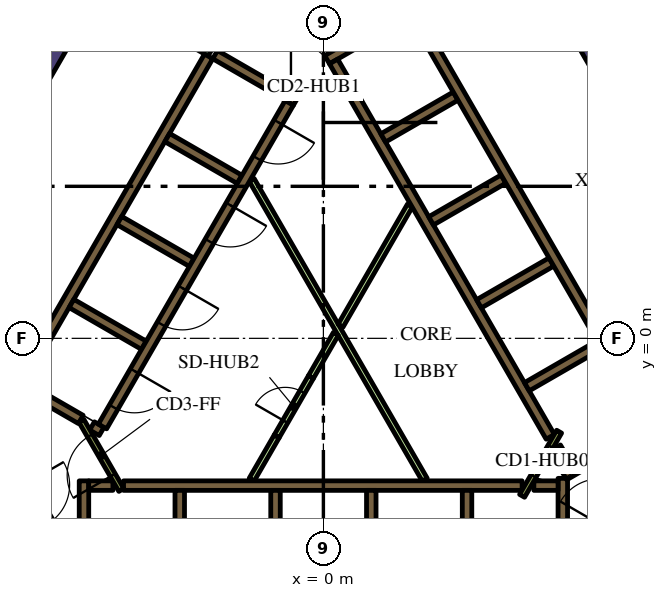
"""IFC4 building model, lengths in metres.
Left out: names, types, materials, properties, quantities, classifications, styles, units other than length and angle.
Written with IfcOpenShell. Run it as: python <this file> out.ifc"""

import sys

from ifc_helpers import new_model, si_unit, direction, frame, frame_2d, origin, place, context, subcontext, project, spatial, polyline, rectangle, outline, extrude, element, fill, save


model = new_model("IFC4")
c1 = context("Model", 3, precision=1e-05, world=origin(), true_north=direction((0.0, 1.0)))
c2 = subcontext(c1, "Body", "Model", "MODEL_VIEW")
j1 = project(units=[si_unit("LENGTHUNIT", "METRE"), si_unit("PLANEANGLEUNIT", "RADIAN")], contexts=[c1])
p1 = place(None, origin())
s1 = spatial("IfcSite", under=j1, at=p1, CompositionType="ELEMENT")
p2 = place(p1, origin())
s2 = spatial("IfcBuilding", under=s1, at=p2, CompositionType="ELEMENT")
p3 = place(p2, frame((0.0, 0.0, 196.2)))
s3 = spatial("IfcBuildingStorey", under=s2, at=p3, CompositionType="ELEMENT", Elevation=196.2)
p4 = place(p3, frame((8.279, 5.761, 0.0), z_axis=(0.0, 0.0, 1.0), x_axis=(-0.500010359015, 0.866019422922, 0.0)))
e1 = element("IfcWall", 1, at=p4, inside=s3, PredefinedType="SOLIDWALL", context=c2, shape_type="SweptSolid", body=[
    extrude(rectangle(XDim=12.528, YDim=0.8, at=frame_2d((6.264, 0.0))), origin(), (0.0, 0.0, 1.0), 5.4),
])
p5 = place(p3, frame((-4.321, 12.616, 0.0), z_axis=(0.0, 0.0, 1.0), x_axis=(-0.500009809857, -0.866019739987, 0.0)))
e2 = element("IfcWall", 2, at=p5, inside=s3, PredefinedType="SOLIDWALL", context=c2, shape_type="SweptSolid", body=[
    extrude(rectangle(XDim=16.695, YDim=0.8, at=frame_2d((8.347, 0.0))), origin(), (0.0, 0.0, 1.0), 5.4),
])
p6 = place(p3, frame((-5.259, -3.875, 0.0), z_axis=(0.0, 0.0, 1.0), x_axis=(1.0, 0.0, 0.0)))
e3 = element("IfcWall", 3, at=p6, inside=s3, PredefinedType="SOLIDWALL", context=c2, shape_type="SweptSolid", body=[
    extrude(rectangle(XDim=10.489, YDim=0.25, at=frame_2d((5.244, 0.0))), origin(), (0.0, 0.0, 1.0), 5.4),
])
for number, where, z_axis, x_axis in (
    (4, (3.78, -4.0, 0.0), (0.0, 0.0, 1.0), (0.0, -1.0, 0.0)),
    (5, (1.26, -4.0, 0.0), (0.0, 0.0, 1.0), (0.0, -1.0, 0.0)),
    (6, (-1.26, -4.0, 0.0), (0.0, 0.0, 1.0), (0.0, -1.0, 0.0)),
    (7, (-3.78, -4.0, 0.0), (0.0, 0.0, 1.0), (0.0, -1.0, 0.0)),
):
    element("IfcWall", number, at=place(p3, frame(where, z_axis=z_axis, x_axis=x_axis)), inside=s3, PredefinedType="SOLIDWALL", context=c2, shape_type="SweptSolid", body=[
        extrude(rectangle(XDim=2.2, YDim=0.25, at=frame_2d((1.1, 0.0))), origin(), (0.0, 0.0, 1.0), 5.4),
    ])
p7 = place(p3, frame((-6.3, -7.125, 0.0), z_axis=(0.0, 0.0, 1.0), x_axis=(0.0, 1.0, 0.0)))
e8 = element("IfcWall", 8, at=p7, inside=s3, PredefinedType="SOLIDWALL", context=c2, shape_type="SweptSolid", body=[
    extrude(rectangle(XDim=3.375, YDim=0.25, at=frame_2d((1.687, 0.0))), origin(), (0.0, 0.0, 1.0), 5.4),
])
p8 = place(p3, frame((-6.175, -3.875, 0.0), z_axis=(0.0, 0.0, 1.0), x_axis=(1.0, 0.0, 0.0)))
e9 = element("IfcWall", 9, at=p8, inside=s3, PredefinedType="SOLIDWALL", context=c2, shape_type="SweptSolid", body=[
    extrude(rectangle(XDim=0.637, YDim=0.25, at=frame_2d((0.318, 0.0))), origin(), (0.0, 0.0, 1.0), 5.4),
])
p9 = place(p3, frame((6.3, -7.24, 0.0), z_axis=(0.0, 0.0, 1.0), x_axis=(0.0, 1.0, 0.0)))
e10 = element("IfcWall", 10, at=p9, inside=s3, PredefinedType="SOLIDWALL", context=c2, shape_type="SweptSolid", body=[
    extrude(rectangle(XDim=3.556, YDim=0.25, at=frame_2d((1.778, 0.0))), origin(), (0.0, 0.0, 1.0), 5.4),
])
p10 = place(p3, frame((5.538, -3.875, 0.0), z_axis=(0.0, 0.0, 1.0), x_axis=(1.0, 0.0, 0.0)))
e11 = element("IfcWall", 11, at=p10, inside=s3, PredefinedType="SOLIDWALL", context=c2, shape_type="SweptSolid", body=[
    extrude(rectangle(XDim=0.637, YDim=0.25, at=frame_2d((0.318, 0.0))), origin(), (0.0, 0.0, 1.0), 5.4),
])
p11 = place(p3, frame((9.19, -1.969, 0.0), z_axis=(0.0, 0.0, 1.0), x_axis=(-0.866057109641, -0.499945079824, 0.0)))
e12 = element("IfcWall", 12, at=p11, inside=s3, PredefinedType="SOLIDWALL", context=c2, shape_type="SweptSolid", body=[
    extrude(rectangle(XDim=3.291, YDim=0.25, at=frame_2d((1.646, 0.0))), origin(), (0.0, 0.0, 1.0), 5.4),
])
p12 = place(p3, frame((6.13, -2.867, 0.0), z_axis=(0.0, 0.0, 1.0), x_axis=(0.500160776593, -0.865932559475, 0.0)))
e13 = element("IfcWall", 13, at=p12, inside=s3, PredefinedType="SOLIDWALL", context=c2, shape_type="SweptSolid", body=[
    extrude(rectangle(XDim=0.627, YDim=0.25, at=frame_2d((0.313, 0.0))), origin(), (0.0, 0.0, 1.0), 5.4),
])
p13 = place(p3, frame((3.1, 9.064, 0.0), z_axis=(0.0, 0.0, 1.0), x_axis=(-0.866033137035, -0.499986605379, 0.0)))
e14 = element("IfcWall", 14, at=p13, inside=s3, PredefinedType="SOLIDWALL", context=c2, shape_type="SweptSolid", body=[
    extrude(rectangle(XDim=3.467, YDim=0.25, at=frame_2d((1.733, 0.0))), origin(), (0.0, 0.0, 1.0), 5.4),
])
p14 = place(p3, frame((0.268, 7.285, 0.0), z_axis=(0.0, 0.0, 1.0), x_axis=(0.500098681536, -0.865968422476, 0.0)))
e15 = element("IfcWall", 15, at=p14, inside=s3, PredefinedType="SOLIDWALL", context=c2, shape_type="SweptSolid", body=[
    extrude(rectangle(XDim=0.636, YDim=0.25, at=frame_2d((0.318, 0.0))), origin(), (0.0, 0.0, 1.0), 5.4),
])
p15 = place(p3, frame((5.97, -2.591, 0.0), z_axis=(0.0, 0.0, 1.0), x_axis=(-0.499994469932, 0.866028596547, 0.0)))
e16 = element("IfcWall", 16, at=p15, inside=s3, PredefinedType="SOLIDWALL", context=c2, shape_type="SweptSolid", body=[
    extrude(rectangle(XDim=10.488, YDim=0.25, at=frame_2d((5.244, 0.0))), origin(), (0.0, 0.0, 1.0), 5.4),
])
p16 = place(p3, frame((1.574, 5.274, 0.0), z_axis=(0.0, 0.0, 1.0), x_axis=(0.866028486751, 0.499994660107, 0.0)))
e17 = element("IfcWall", 17, at=p16, inside=s3, PredefinedType="SOLIDWALL", context=c2, shape_type="SweptSolid", body=[
    extrude(rectangle(XDim=2.2, YDim=0.25, at=frame_2d((1.1, 0.0))), origin(), (0.0, 0.0, 1.0), 5.4),
])
for number, where, z_axis, x_axis in (
    (18, (2.834, 3.091, 0.0), (0.0, 0.0, 1.0), (0.866, 0.5, 0.0)),
    (19, (4.094, 0.909, 0.0), (0.0, 0.0, 1.0), (0.866, 0.5, 0.0)),
    (20, (5.354, -1.274, 0.0), (0.0, 0.0, 1.0), (0.866, 0.5, 0.0)),
):
    element("IfcWall", number, at=place(p3, frame(where, z_axis=z_axis, x_axis=x_axis)), inside=s3, PredefinedType="SOLIDWALL", context=c2, shape_type="SweptSolid", body=[
        extrude(rectangle(XDim=2.2, YDim=0.25, at=frame_2d((1.1, 0.0))), origin(), (0.0, 0.0, 1.0), 5.4),
    ])
p17 = place(p3, frame((-3.02, 7.419, 0.0), z_axis=(0.0, 0.0, 1.0), x_axis=(-0.500022956343, -0.866012149528, 0.0)))
e21 = element("IfcWall", 21, at=p17, inside=s3, PredefinedType="SOLIDWALL", context=c2, shape_type="SweptSolid", body=[
    extrude(rectangle(XDim=10.08, YDim=0.25, at=frame_2d((5.04, 0.0))), origin(), (0.0, 0.0, 1.0), 5.4),
])
p18 = place(p3, origin())
e22 = element("IfcWall", 22, at=p18, inside=s3, PredefinedType="SOLIDWALL", context=c2, shape_type="SweptSolid", body=[
    extrude(outline(polyline([(-2.912, 7.356), (-2.787, 7.573), (-1.232, 6.675), (-1.303, 6.675), (-1.304, 6.675), (-1.304, 6.675), (-1.304, 6.525), (-1.304, 6.525), (-1.303, 6.525), (-0.971, 6.525), (-0.665, 6.348), (-0.79, 6.132), (-1.007, 6.257), (-1.007, 6.257), (-2.912, 7.356)])), origin(), (0.0, 0.0, 1.0), 5.4),
])
for number, where, z_axis, x_axis in (
    (23, (-2.204, 4.182, 0.0), (0.0, 0.0, 1.0), (-0.866, 0.5, 0.0)),
    (24, (-5.369, 3.1, 0.0), (0.0, 0.0, 1.0), (0.866, -0.5, 0.0)),
    (25, (-4.724, -0.182, 0.0), (0.0, 0.0, 1.0), (-0.866, 0.5, 0.0)),
):
    element("IfcWall", number, at=place(p3, frame(where, z_axis=z_axis, x_axis=x_axis)), inside=s3, PredefinedType="SOLIDWALL", context=c2, shape_type="SweptSolid", body=[
        extrude(rectangle(XDim=2.2, YDim=0.25, at=frame_2d((1.1, 0.0))), origin(), (0.0, 0.0, 1.0), 5.4),
    ])
p19 = place(p3, frame((-6.088, -2.305, 0.0), z_axis=(0.0, 0.0, 1.0), x_axis=(0.866059450854, -0.499941024108, 0.0)))
e26 = element("IfcWall", 26, at=p19, inside=s3, PredefinedType="SOLIDWALL", context=c2, shape_type="SweptSolid", body=[
    extrude(rectangle(XDim=0.29, YDim=0.25, at=frame_2d((0.145, 0.0))), origin(), (0.0, 0.0, 1.0), 5.4),
])
p20 = place(p3, frame((-7.889, -1.265, 0.0), z_axis=(0.0, 0.0, 1.0), x_axis=(0.865986741702, -0.500066958712, 0.0)))
e27 = element("IfcWall", 27, at=p20, inside=s3, PredefinedType="SOLIDWALL", context=c2, shape_type="SweptSolid", body=[
    extrude(rectangle(XDim=1.738, YDim=0.25, at=frame_2d((0.869, 0.0))), origin(), (0.0, 0.0, 1.0), 5.4),
])
p21 = place(p3, frame((-1.887, 4.168, 0.0), z_axis=(0.0, 0.0, 1.0), x_axis=(0.499997069472, -0.866027095719, 0.0)))
e28 = element("IfcWall", 28, at=p21, inside=s3, PredefinedType="PARTITIONING", context=c2, shape_type="SweptSolid", body=[
    extrude(rectangle(XDim=9.106, YDim=0.15, at=frame_2d((4.553, 0.0))), origin(), (0.0, 0.0, 1.0), 4.65),
])
p22 = place(p3, frame((-0.329, -1.021, 0.0), z_axis=(0.0, 0.0, 1.0), x_axis=(0.500033191285, 0.866006239939, 0.0)))
e29 = element("IfcWall", 29, at=p22, inside=s3, PredefinedType="PARTITIONING", context=c2, shape_type="SweptSolid", body=[
    extrude(rectangle(XDim=1.315, YDim=0.15, at=frame_2d((0.657, 0.0))), origin(), (0.0, 0.0, 1.0), 4.65),
])
p23 = place(p3, frame((2.277, 3.493, 0.0), z_axis=(0.0, 0.0, 1.0), x_axis=(-0.499994550825, -0.866028549844, 0.0)))
e30 = element("IfcWall", 30, at=p23, inside=s3, PredefinedType="PARTITIONING", context=c2, shape_type="SweptSolid", body=[
    extrude(rectangle(XDim=3.65, YDim=0.15, at=frame_2d((1.825, 0.0))), origin(), (0.0, 0.0, 1.0), 4.65),
])
p24 = place(p3, frame((-1.887, -3.718, 0.0), z_axis=(0.0, 0.0, 1.0), x_axis=(0.500033191285, 0.866006239939, 0.0)))
e31 = element("IfcWall", 31, at=p24, inside=s3, PredefinedType="PARTITIONING", context=c2, shape_type="SweptSolid", body=[
    extrude(rectangle(XDim=1.315, YDim=0.15, at=frame_2d((0.657, 0.0))), origin(), (0.0, 0.0, 1.0), 4.65),
])
p25 = place(p3, frame((8.565, -2.185, 0.0), z_axis=(0.0, 0.0, 1.0), x_axis=(-0.499997954832, 0.866026584559, 0.0)))
e32 = element("IfcWall", 32, at=p25, inside=s3, PredefinedType="SOLIDWALL", context=c2, shape_type="SweptSolid", body=[
    extrude(rectangle(XDim=12.35, YDim=0.25, at=frame_2d((6.175, 0.0))), origin(), (0.0, 0.0, 1.0), 5.4),
])
p26 = place(p25, frame((0.585, 0.0, 0.0)))
e33 = element("IfcOpeningElement", 33, at=p26, cuts=e32, PredefinedType="OPENING", context=c2, shape_type="SweptSolid", body=[
    extrude(rectangle(XDim=1.1, YDim=2.1, at=frame_2d((0.55, 1.05))), frame((0.0, 0.135, 0.0), z_axis=(0.0, -1.0, 0.0), x_axis=(1.0, 0.0, 0.0)), (0.0, 0.0, 1.0), 0.27),
])
p27 = place(p3, frame((-0.898, 6.194, 0.0), z_axis=(0.0, 0.0, 1.0), x_axis=(-0.499996202215, -0.866027596426, 0.0)))
e34 = element("IfcWall", 34, at=p27, inside=s3, PredefinedType="SOLIDWALL", context=c2, shape_type="SweptSolid", body=[
    extrude(rectangle(XDim=9.83, YDim=0.25, at=frame_2d((4.915, 0.0))), origin(), (0.0, 0.0, 1.0), 5.4),
])
p28 = place(p27, frame((0.585, 0.0, 0.0)))
e35 = element("IfcOpeningElement", 35, at=p28, cuts=e34, PredefinedType="OPENING", context=c2, shape_type="SweptSolid", body=[
    extrude(rectangle(XDim=1.1, YDim=2.1, at=frame_2d((0.55, 1.05))), frame((0.0, 0.135, 0.0), z_axis=(0.0, -1.0, 0.0), x_axis=(1.0, 0.0, 0.0)), (0.0, 0.0, 1.0), 0.27),
])
p29 = place(p27, frame((3.105, 0.0, 0.0)))
e36 = element("IfcOpeningElement", 36, at=p29, cuts=e34, PredefinedType="OPENING", context=c2, shape_type="SweptSolid", body=[
    extrude(rectangle(XDim=1.1, YDim=2.1, at=frame_2d((0.55, 1.05))), frame((0.0, 0.135, 0.0), z_axis=(0.0, -1.0, 0.0), x_axis=(1.0, 0.0, 0.0)), (0.0, 0.0, 1.0), 0.27),
])
p30 = place(p27, frame((5.625, 0.0, 0.0)))
e37 = element("IfcOpeningElement", 37, at=p30, cuts=e34, PredefinedType="OPENING", context=c2, shape_type="SweptSolid", body=[
    extrude(rectangle(XDim=1.1, YDim=2.1, at=frame_2d((0.55, 1.05))), frame((0.0, 0.135, 0.0), z_axis=(0.0, -1.0, 0.0), x_axis=(1.0, 0.0, 0.0)), (0.0, 0.0, 1.0), 0.27),
])
p31 = place(p27, frame((8.145, 0.0, 0.0)))
e38 = element("IfcOpeningElement", 38, at=p31, cuts=e34, PredefinedType="OPENING", context=c2, shape_type="SweptSolid", body=[
    extrude(rectangle(XDim=1.1, YDim=2.1, at=frame_2d((0.55, 1.05))), frame((0.0, 0.135, 0.0), z_axis=(0.0, -1.0, 0.0), x_axis=(1.0, 0.0, 0.0)), (0.0, 0.0, 1.0), 0.27),
])
p32 = place(p3, frame((7.053, -5.284, 0.0), z_axis=(0.0, 0.0, 1.0), x_axis=(0.500078061341, 0.865980330357, 0.0)))
e39 = element("IfcWall", 39, at=p32, inside=s3, PredefinedType="SOLIDWALL", context=c2, shape_type="SweptSolid", body=[
    extrude(rectangle(XDim=2.1, YDim=0.4, at=frame_2d((1.05, 0.0))), origin(), (0.0, 0.0, 1.0), 5.4),
])
p33 = place(p32, frame((0.45, 0.0, 0.0)))
e40 = element("IfcOpeningElement", 40, at=p33, cuts=e39, PredefinedType="OPENING", context=c2, shape_type="SweptSolid", body=[
    extrude(rectangle(XDim=1.2, YDim=2.1, at=frame_2d((0.6, 1.05))), frame((0.0, 0.21, 0.0), z_axis=(0.0, -1.0, 0.0), x_axis=(1.0, 0.0, 0.0)), (0.0, 0.0, 1.0), 0.42),
])
p34 = place(p3, frame((-8.103, -3.466, 0.0), z_axis=(0.0, 0.0, 1.0), x_axis=(0.500078061341, -0.865980330357, 0.0)))
e41 = element("IfcWall", 41, at=p34, inside=s3, PredefinedType="SOLIDWALL", context=c2, shape_type="SweptSolid", body=[
    extrude(rectangle(XDim=2.1, YDim=0.4, at=frame_2d((1.05, 0.0))), origin(), (0.0, 0.0, 1.0), 5.4),
])
p35 = place(p34, frame((0.45, 0.0, 0.0)))
e42 = element("IfcOpeningElement", 42, at=p35, cuts=e41, PredefinedType="OPENING", context=c2, shape_type="SweptSolid", body=[
    extrude(rectangle(XDim=1.2, YDim=2.1, at=frame_2d((0.6, 1.05))), frame((0.0, 0.21, 0.0), z_axis=(0.0, -1.0, 0.0), x_axis=(1.0, 0.0, 0.0)), (0.0, 0.0, 1.0), 0.42),
])
p36 = place(p3, frame((6.203, -2.456, 0.0), z_axis=(0.0, 0.0, 1.0), x_axis=(-0.500043961785, -0.866000020948, 0.0)))
e43 = element("IfcWall", 43, at=p36, inside=s3, PredefinedType="PARTITIONING", context=c2, shape_type="SweptSolid", body=[
    extrude(rectangle(XDim=1.95, YDim=0.15, at=frame_2d((0.975, 0.0))), origin(), (0.0, 0.0, 1.0), 5.4),
])
p37 = place(p36, frame((0.45, 0.0, 0.0)))
e44 = element("IfcOpeningElement", 44, at=p37, cuts=e43, PredefinedType="OPENING", context=c2, shape_type="SweptSolid", body=[
    extrude(rectangle(XDim=0.9, YDim=2.1, at=frame_2d((0.45, 1.05))), frame((0.0, 0.085, 0.0), z_axis=(0.0, -1.0, 0.0), x_axis=(1.0, 0.0, 0.0)), (0.0, 0.0, 1.0), 0.17),
])
p38 = place(p3, frame((-1.303, 6.6, 0.0), z_axis=(0.0, 0.0, 1.0), x_axis=(1.0, 0.0, 0.0)))
e45 = element("IfcWall", 45, at=p38, inside=s3, PredefinedType="PARTITIONING", context=c2, shape_type="SweptSolid", body=[
    extrude(rectangle(XDim=2.1, YDim=0.15, at=frame_2d((1.05, 0.0))), origin(), (0.0, 0.0, 1.0), 5.4),
])
p39 = place(p38, frame((0.45, 0.0, 0.0)))
e46 = element("IfcOpeningElement", 46, at=p39, cuts=e45, PredefinedType="OPENING", context=c2, shape_type="SweptSolid", body=[
    extrude(rectangle(XDim=1.2, YDim=2.1, at=frame_2d((0.6, 1.05))), frame((0.0, 0.085, 0.0), z_axis=(0.0, -1.0, 0.0), x_axis=(1.0, 0.0, 0.0)), (0.0, 0.0, 1.0), 0.17),
])
p40 = place(p3, frame((-5.317, -3.99, 0.0), z_axis=(0.0, 0.0, 1.0), x_axis=(-0.500027713859, 0.866009402589, 0.0)))
e47 = element("IfcWall", 47, at=p40, inside=s3, PredefinedType="PARTITIONING", context=c2, shape_type="SweptSolid", body=[
    extrude(rectangle(XDim=2.1, YDim=0.15, at=frame_2d((1.05, 0.0))), origin(), (0.0, 0.0, 1.0), 5.4),
])
p41 = place(p40, frame((0.45, 0.0, 0.0)))
e48 = element("IfcOpeningElement", 48, at=p41, cuts=e47, PredefinedType="OPENING", context=c2, shape_type="SweptSolid", body=[
    extrude(rectangle(XDim=1.2, YDim=2.1, at=frame_2d((0.6, 1.05))), frame((0.0, 0.085, 0.0), z_axis=(0.0, -1.0, 0.0), x_axis=(1.0, 0.0, 0.0)), (0.0, 0.0, 1.0), 0.17),
])
p42 = place(p3, frame((-4.796, 8.575, 0.0), z_axis=(0.0, 0.0, 1.0), x_axis=(0.866009402589, -0.500027713859, 0.0)))
e49 = element("IfcWall", 49, at=p42, inside=s3, PredefinedType="PARTITIONING", context=c2, shape_type="SweptSolid", body=[
    extrude(rectangle(XDim=2.1, YDim=0.226, at=frame_2d((1.05, 0.0))), origin(), (0.0, 0.0, 1.0), 4.65),
])
p43 = place(p42, frame((0.45, 0.0, 0.0)))
e50 = element("IfcOpeningElement", 50, at=p43, cuts=e49, PredefinedType="OPENING", context=c2, shape_type="SweptSolid", body=[
    extrude(rectangle(XDim=1.2, YDim=2.1, at=frame_2d((0.6, 1.05))), frame((0.0, 0.123, 0.0), z_axis=(0.0, -1.0, 0.0), x_axis=(1.0, 0.0, 0.0)), (0.0, 0.0, 1.0), 0.246),
])
p44 = place(p3, frame((-1.229, -2.579, 0.0), z_axis=(0.0, 0.0, 1.0), x_axis=(0.500062916607, 0.865989075817, 0.0)))
e51 = element("IfcWall", 51, at=p44, inside=s3, PredefinedType="PARTITIONING", context=c2, shape_type="SweptSolid", body=[
    extrude(rectangle(XDim=1.8, YDim=0.15, at=frame_2d((0.9, 0.0))), origin(), (0.0, 0.0, 1.0), 4.65),
])
p45 = place(p44, frame((0.45, 0.0, 0.0)))
e52 = element("IfcOpeningElement", 52, at=p45, cuts=e51, PredefinedType="OPENING", context=c2, shape_type="SweptSolid", body=[
    extrude(rectangle(XDim=0.9, YDim=2.1, at=frame_2d((0.45, 1.05))), frame((0.0, 0.085, 0.0), z_axis=(0.0, -1.0, 0.0), x_axis=(1.0, 0.0, 0.0)), (0.0, 0.0, 1.0), 0.17),
])
p46 = place(p28, origin())
e53 = element("IfcDoor", 53, at=p46, inside=s3, OperationType="DOUBLE_DOOR_SLIDING", PredefinedType="DOOR", context=c2, shape_type="SweptSolid", body=[
    extrude(rectangle(XDim=1.1, YDim=2.1, at=frame_2d((0.55, 1.05))), frame((0.0, 0.025, 0.0), z_axis=(0.0, -1.0, 0.0), x_axis=(1.0, 0.0, 0.0)), (0.0, 0.0, 1.0), 0.05),
])
fill(e35, e53)
p47 = place(p29, origin())
e54 = element("IfcDoor", 54, at=p47, inside=s3, OperationType="DOUBLE_DOOR_SLIDING", PredefinedType="DOOR", context=c2, shape_type="SweptSolid", body=[
    extrude(rectangle(XDim=1.1, YDim=2.1, at=frame_2d((0.55, 1.05))), frame((0.0, 0.025, 0.0), z_axis=(0.0, -1.0, 0.0), x_axis=(1.0, 0.0, 0.0)), (0.0, 0.0, 1.0), 0.05),
])
fill(e36, e54)
p48 = place(p30, origin())
e55 = element("IfcDoor", 55, at=p48, inside=s3, OperationType="DOUBLE_DOOR_SLIDING", PredefinedType="DOOR", context=c2, shape_type="SweptSolid", body=[
    extrude(rectangle(XDim=1.1, YDim=2.1, at=frame_2d((0.55, 1.05))), frame((0.0, 0.025, 0.0), z_axis=(0.0, -1.0, 0.0), x_axis=(1.0, 0.0, 0.0)), (0.0, 0.0, 1.0), 0.05),
])
fill(e37, e55)
p49 = place(p31, origin())
e56 = element("IfcDoor", 56, at=p49, inside=s3, OperationType="DOUBLE_DOOR_SLIDING", PredefinedType="DOOR", context=c2, shape_type="SweptSolid", body=[
    extrude(rectangle(XDim=1.1, YDim=2.1, at=frame_2d((0.55, 1.05))), frame((0.0, 0.025, 0.0), z_axis=(0.0, -1.0, 0.0), x_axis=(1.0, 0.0, 0.0)), (0.0, 0.0, 1.0), 0.05),
])
fill(e38, e56)
p50 = place(p37, origin())
e57 = element("IfcDoor", 57, at=p50, inside=s3, OperationType="SINGLE_SWING_LEFT", PredefinedType="DOOR", context=c2, shape_type="SweptSolid", body=[
    extrude(rectangle(XDim=0.9, YDim=2.1, at=frame_2d((0.45, 1.05))), frame((0.0, 0.025, 0.0), z_axis=(0.0, -1.0, 0.0), x_axis=(1.0, 0.0, 0.0)), (0.0, 0.0, 1.0), 0.05),
])
fill(e44, e57)
p51 = place(p39, origin())
e58 = element("IfcDoor", 58, at=p51, inside=s3, OperationType="SINGLE_SWING_LEFT", PredefinedType="DOOR", context=c2, shape_type="SweptSolid", body=[
    extrude(rectangle(XDim=1.2, YDim=2.1, at=frame_2d((0.6, 1.05))), frame((0.0, 0.025, 0.0), z_axis=(0.0, -1.0, 0.0), x_axis=(1.0, 0.0, 0.0)), (0.0, 0.0, 1.0), 0.05),
])
fill(e46, e58)
p52 = place(p41, origin())
e59 = element("IfcDoor", 59, at=p52, inside=s3, OperationType="SINGLE_SWING_LEFT", PredefinedType="DOOR", context=c2, shape_type="SweptSolid", body=[
    extrude(rectangle(XDim=1.2, YDim=2.1, at=frame_2d((0.6, 1.05))), frame((0.0, 0.025, 0.0), z_axis=(0.0, -1.0, 0.0), x_axis=(1.0, 0.0, 0.0)), (0.0, 0.0, 1.0), 0.05),
])
fill(e48, e59)
p53 = place(p45, origin())
e60 = element("IfcDoor", 60, at=p53, inside=s3, OperationType="SINGLE_SWING_LEFT", PredefinedType="DOOR", context=c2, shape_type="SweptSolid", body=[
    extrude(rectangle(XDim=0.9, YDim=2.1, at=frame_2d((0.45, 1.05))), frame((0.0, 0.025, 0.0), z_axis=(0.0, -1.0, 0.0), x_axis=(1.0, 0.0, 0.0)), (0.0, 0.0, 1.0), 0.05),
])
fill(e52, e60)
save(model, sys.argv[1])
